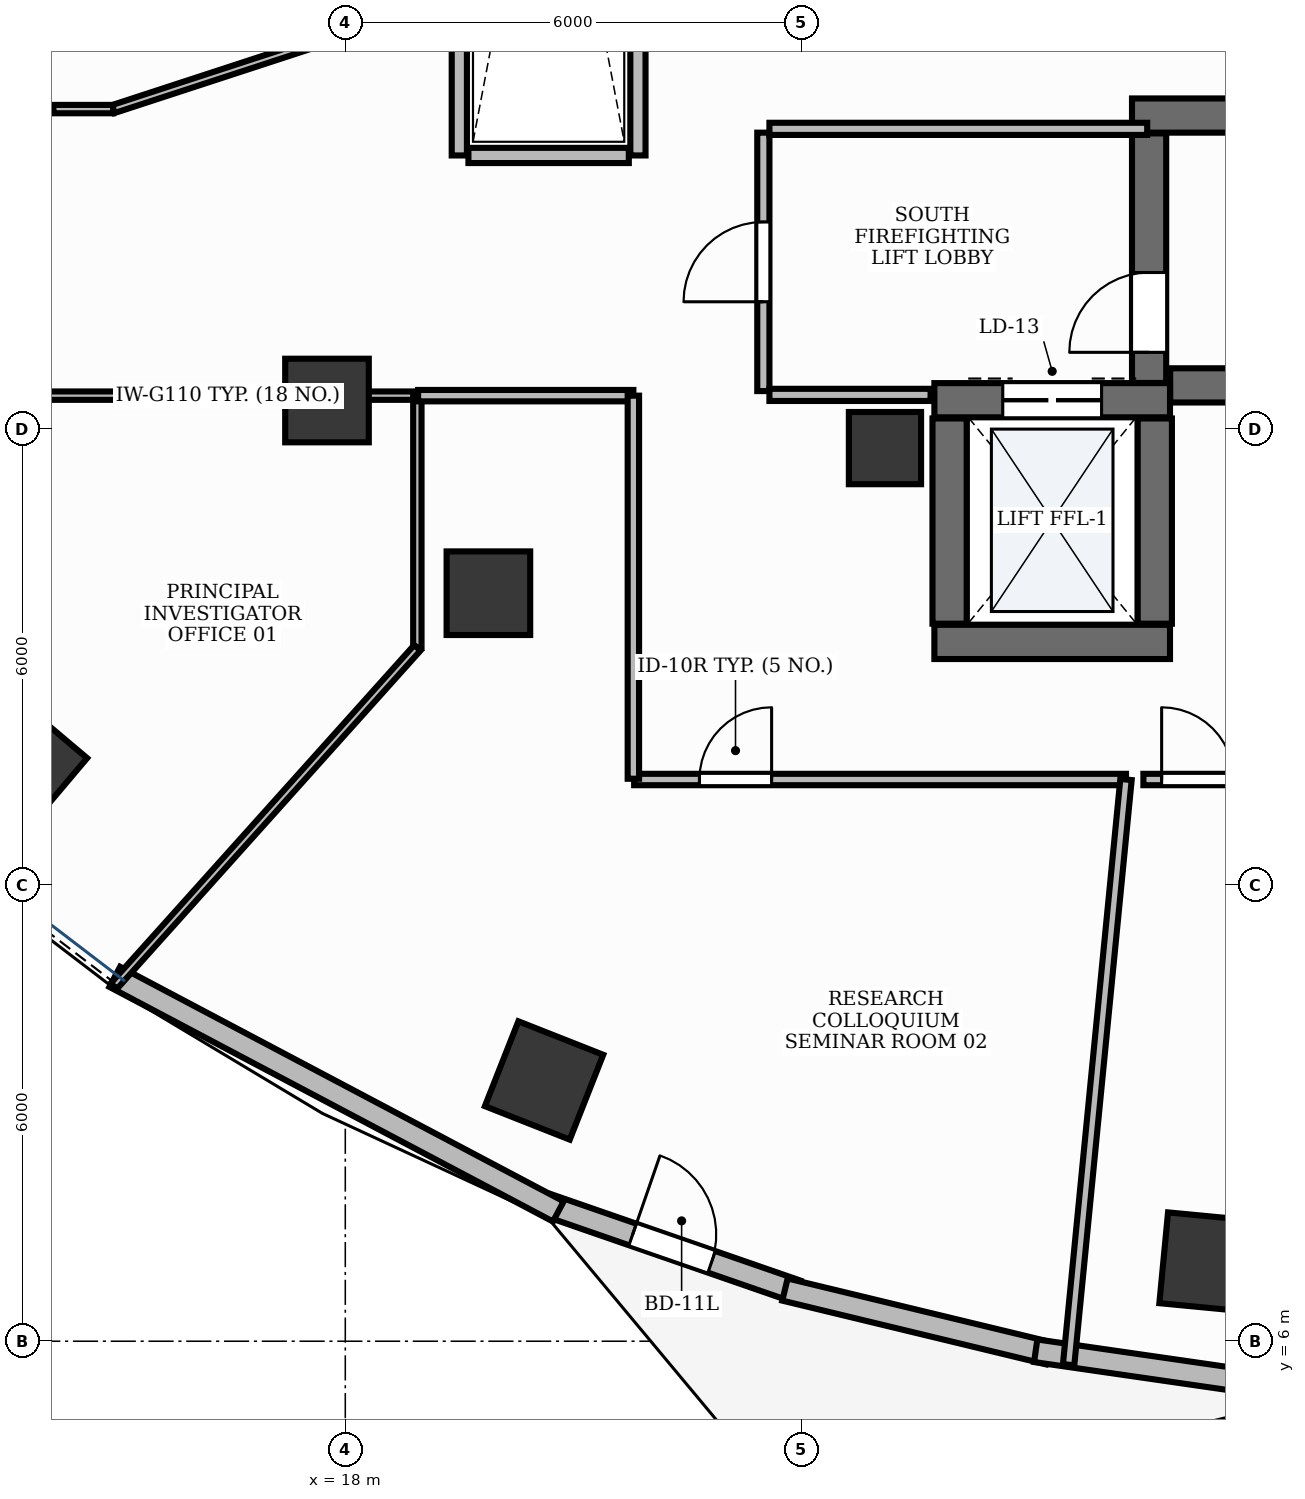
"""IFC4 building model, lengths in metres.
Left out: names, types, materials, properties, quantities, classifications, styles, units other than length and angle.
Written with IfcOpenShell. Run it as: python <this file> out.ifc"""

import sys

from ifc_helpers import new_model, si_unit, direction, frame, frame_2d, origin, origin_2d, place, context, subcontext, project, spatial, rectangle, extrude, element, fill, save


model = new_model("IFC4")
c1 = context("Model", 3, precision=1e-05, world=origin(), true_north=direction((0.0, 1.0)))
c2 = subcontext(c1, "Body", "Model", "MODEL_VIEW")
j1 = project(units=[si_unit("LENGTHUNIT", "METRE"), si_unit("PLANEANGLEUNIT", "RADIAN")], contexts=[c1])
p1 = place(None, origin())
s1 = spatial("IfcSite", under=j1, at=p1, CompositionType="ELEMENT")
p2 = place(p1, origin())
s2 = spatial("IfcBuilding", under=s1, at=p2, CompositionType="ELEMENT")
p3 = place(p2, frame((0.0, 0.0, 94.2)))
s3 = spatial("IfcBuildingStorey", under=s2, at=p3, CompositionType="ELEMENT", Elevation=94.2)
p4 = place(p3, frame((28.852, 18.575, 0.0), z_axis=(0.0, 0.0, 1.0), x_axis=(1.0, 0.0, 0.0)))
e1 = element("IfcWall", 1, at=p4, inside=s3, PredefinedType="SHEAR", context=c2, shape_type="SweptSolid", body=[
    extrude(rectangle(XDim=8.248, YDim=0.45, at=frame_2d((4.124, 0.0))), origin(), (0.0, 0.0, 1.0), 3.9),
])
p5 = place(p3, frame((28.35, 22.125, 0.0), z_axis=(0.0, 0.0, 1.0), x_axis=(1.0, 0.0, 0.0)))
e2 = element("IfcWall", 2, at=p5, inside=s3, PredefinedType="SHEAR", context=c2, shape_type="SweptSolid", body=[
    extrude(rectangle(XDim=8.75, YDim=0.45, at=frame_2d((4.375, 0.0))), origin(), (0.0, 0.0, 1.0), 3.9),
])
p6 = place(p3, frame((28.575, 18.607, 0.0), z_axis=(0.0, 0.0, 1.0), x_axis=(0.0, 1.0, 0.0)))
e3 = element("IfcWall", 3, at=p6, inside=s3, PredefinedType="SHEAR", context=c2, shape_type="SweptSolid", body=[
    extrude(rectangle(XDim=3.283, YDim=0.45, at=frame_2d((1.642, 0.0))), origin(), (0.0, 0.0, 1.0), 3.9),
])
p7 = place(p6, frame((0.403, 0.0, 0.0)))
e4 = element("IfcOpeningElement", 4, at=p7, cuts=e3, PredefinedType="OPENING", context=c2, shape_type="SweptSolid", body=[
    extrude(rectangle(XDim=1.05, YDim=2.15, at=frame_2d((0.525, 1.075))), frame((0.0, 0.24, 0.0), z_axis=(0.0, -1.0, 0.0), x_axis=(1.0, 0.0, 0.0)), (0.0, 0.0, 1.0), 0.48),
])
p8 = place(p3, frame((25.75, 15.2, 0.0), z_axis=(0.0, 0.0, 1.0), x_axis=(1.0, 0.0, 0.0)))
e5 = element("IfcWall", 5, at=p8, inside=s3, PredefinedType="SHEAR", context=c2, shape_type="SweptSolid", body=[
    extrude(rectangle(XDim=3.1, YDim=0.45, at=frame_2d((1.55, 0.0))), origin(), (0.0, 0.0, 1.0), 3.9),
])
p9 = place(p3, frame((25.75, 18.38, 0.0), z_axis=(0.0, 0.0, 1.0), x_axis=(1.0, 0.0, 0.0)))
e6 = element("IfcWall", 6, at=p9, inside=s3, PredefinedType="SHEAR", context=c2, shape_type="SweptSolid", body=[
    extrude(rectangle(XDim=3.1, YDim=0.45, at=frame_2d((1.55, 0.0))), origin(), (0.0, 0.0, 1.0), 3.9),
])
p10 = place(p9, frame((0.9, 0.0, 0.0)))
e7 = element("IfcOpeningElement", 7, at=p10, cuts=e6, PredefinedType="OPENING", context=c2, shape_type="SweptSolid", body=[
    extrude(rectangle(XDim=1.3, YDim=2.2, at=frame_2d((0.65, 1.1))), frame((0.0, 0.24, 0.0), z_axis=(0.0, -1.0, 0.0), x_axis=(1.0, 0.0, 0.0)), (0.0, 0.0, 1.0), 0.48),
])
for number, where, z_axis, x_axis in (
    (8, (25.95, 15.44, 0.0), (0.0, 0.0, 1.0), (0.0, 1.0, 0.0)),
    (9, (28.65, 15.44, 0.0), (0.0, 0.0, 1.0), (0.0, 1.0, 0.0)),
):
    element("IfcWall", number, at=place(p3, frame(where, z_axis=z_axis, x_axis=x_axis)), inside=s3, PredefinedType="SHEAR", context=c2, shape_type="SweptSolid", body=[
        extrude(rectangle(XDim=2.7, YDim=0.45, at=frame_2d((1.35, 0.0))), origin(), (0.0, 0.0, 1.0), 3.9),
    ])
p11 = place(p3, frame((25.1, 17.75, -0.0), z_axis=(0.0, 0.0, 1.0), x_axis=(1.0, 0.0, 0.0)))
e10 = element("IfcColumn", 10, at=p11, inside=s3, PredefinedType="PILASTER", context=c2, shape_type="SweptSolid", body=[
    extrude(rectangle(XDim=0.95, YDim=0.95, at=origin_2d()), origin(), (0.0, 0.0, 1.0), 3.901),
])
p12 = place(p3, frame((17.759, 18.376, -0.0), z_axis=(0.0, 0.0, 1.0), x_axis=(1.0, 0.0, 0.0)))
e11 = element("IfcColumn", 11, at=p12, inside=s3, PredefinedType="COLUMN", context=c2, shape_type="SweptSolid", body=[
    extrude(rectangle(XDim=1.1, YDim=1.1, at=origin_2d()), origin(), (0.0, 0.0, 1.0), 3.901),
])
p13 = place(p3, frame((13.758, 13.6, -0.0), z_axis=(0.0, 0.0, 1.0), x_axis=(-0.764246456939, 0.644924300253, 0.0)))
e12 = element("IfcColumn", 12, at=p13, inside=s3, PredefinedType="COLUMN", context=c2, shape_type="SweptSolid", body=[
    extrude(rectangle(XDim=1.2, YDim=1.2, at=origin_2d()), origin(), (0.0, 0.0, 1.0), 3.901),
])
p14 = place(p3, frame((19.883, 15.841, -0.0), z_axis=(0.0, 0.0, 1.0), x_axis=(1.0, 0.0, 0.0)))
e13 = element("IfcColumn", 13, at=p14, inside=s3, PredefinedType="COLUMN", context=c2, shape_type="SweptSolid", body=[
    extrude(rectangle(XDim=1.1, YDim=1.1, at=origin_2d()), origin(), (0.0, 0.0, 1.0), 3.901),
])
for number, where, z_axis, x_axis in (
    (14, (20.615, 9.431, -0.0), (0.0, 0.0, 1.0), (-0.93, 0.367, 0.0)),
    (15, (29.364, 7.041, -0.0), (0.0, 0.0, 1.0), (-0.995, 0.095, 0.0)),
):
    element("IfcColumn", number, at=place(p3, frame(where, z_axis=z_axis, x_axis=x_axis)), inside=s3, PredefinedType="COLUMN", context=c2, shape_type="SweptSolid", body=[
        extrude(rectangle(XDim=1.2, YDim=1.2, at=origin_2d()), origin(), (0.0, 0.0, 1.0), 3.901),
    ])
p15 = place(p3, frame((20.662, 7.792, 0.0), z_axis=(0.0, 0.0, 1.0), x_axis=(0.944878029854, -0.3274225232, 0.0)))
e16 = element("IfcWall", 16, at=p15, inside=s3, PredefinedType="STANDARD", context=c2, shape_type="SweptSolid", body=[
    extrude(rectangle(XDim=3.467, YDim=0.3, at=frame_2d((1.734, 0.0))), origin(), (0.0, 0.0, 1.0), 3.9),
])
p16 = place(p15, frame((1.184, 0.0, 0.0)))
e17 = element("IfcOpeningElement", 17, at=p16, cuts=e16, PredefinedType="OPENING", context=c2, shape_type="SweptSolid", body=[
    extrude(rectangle(XDim=1.1, YDim=2.15, at=frame_2d((0.55, 1.075))), frame((0.0, 0.165, 0.0), z_axis=(0.0, -1.0, 0.0), x_axis=(1.0, 0.0, 0.0)), (0.0, 0.0, 1.0), 0.33),
])
p17 = place(p3, frame((14.967, 10.794, 0.0), z_axis=(0.0, 0.0, 1.0), x_axis=(0.883986649445, -0.467512142734, 0.0)))
e18 = element("IfcWall", 18, at=p17, inside=s3, PredefinedType="STANDARD", context=c2, shape_type="SweptSolid", body=[
    extrude(rectangle(XDim=6.601, YDim=0.3, at=frame_2d((3.301, 0.0))), origin(), (0.0, 0.0, 1.0), 3.9),
])
p18 = place(p3, frame((23.784, 6.68, 0.0), z_axis=(0.0, 0.0, 1.0), x_axis=(0.972043452321, -0.234801036625, 0.0)))
e19 = element("IfcWall", 19, at=p18, inside=s3, PredefinedType="STANDARD", context=c2, shape_type="SweptSolid", body=[
    extrude(rectangle(XDim=3.569, YDim=0.3, at=frame_2d((1.784, 0.0))), origin(), (0.0, 0.0, 1.0), 3.9),
])
p19 = place(p3, frame((27.083, 5.875, 0.0), z_axis=(0.0, 0.0, 1.0), x_axis=(0.989734732902, -0.142916613754, 0.0)))
e20 = element("IfcWall", 20, at=p19, inside=s3, PredefinedType="STANDARD", context=c2, shape_type="SweptSolid", body=[
    extrude(rectangle(XDim=3.611, YDim=0.3, at=frame_2d((1.806, 0.0))), origin(), (0.0, 0.0, 1.0), 3.9),
])
for number, where, z_axis, x_axis in (
    (21, (19.5, 21.6, 0.0), (0.0, 0.0, 1.0), (0.0, 1.0, 0.0)),
    (22, (21.85, 21.6, 0.0), (0.0, 0.0, 1.0), (0.0, 1.0, 0.0)),
):
    element("IfcWall", number, at=place(p3, frame(where, z_axis=z_axis, x_axis=x_axis)), inside=s3, PredefinedType="PARTITIONING", context=c2, shape_type="SweptSolid", body=[
        extrude(rectangle(XDim=10.8, YDim=0.2, at=frame_2d((5.4, 0.0))), origin(), (0.0, 0.0, 1.0), 2.91),
    ])
p20 = place(p3, frame((19.62, 21.6, 0.0), z_axis=(0.0, 0.0, 1.0), x_axis=(1.0, 0.0, 0.0)))
e23 = element("IfcWall", 23, at=p20, inside=s3, PredefinedType="PARTITIONING", context=c2, shape_type="SweptSolid", body=[
    extrude(rectangle(XDim=2.11, YDim=0.2, at=frame_2d((1.055, 0.0))), origin(), (0.0, 0.0, 1.0), 2.91),
])
p21 = place(p3, frame((23.5, 18.5, 0.0), z_axis=(0.0, 0.0, 1.0), x_axis=(0.0, 1.0, 0.0)))
e24 = element("IfcWall", 24, at=p21, inside=s3, PredefinedType="PARTITIONING", context=c2, shape_type="SweptSolid", body=[
    extrude(rectangle(XDim=3.4, YDim=0.16, at=frame_2d((1.7, 0.0))), origin(), (0.0, 0.0, 1.0), 2.91),
])
p22 = place(p21, frame((1.175, 0.0, 0.0)))
e25 = element("IfcOpeningElement", 25, at=p22, cuts=e24, PredefinedType="OPENING", context=c2, shape_type="SweptSolid", body=[
    extrude(rectangle(XDim=1.05, YDim=2.15, at=frame_2d((0.525, 1.075))), frame((0.0, 0.095, 0.0), z_axis=(0.0, -1.0, 0.0), x_axis=(1.0, 0.0, 0.0)), (0.0, 0.0, 1.0), 0.19),
])
p23 = place(p3, frame((23.58, 21.95, 0.0), z_axis=(0.0, 0.0, 1.0), x_axis=(1.0, 0.0, 0.0)))
e26 = element("IfcWall", 26, at=p23, inside=s3, PredefinedType="PARTITIONING", context=c2, shape_type="SweptSolid", body=[
    extrude(rectangle(XDim=4.97, YDim=0.16, at=frame_2d((2.485, 0.0))), origin(), (0.0, 0.0, 1.0), 2.91),
])
p24 = place(p3, frame((23.58, 18.45, 0.0), z_axis=(0.0, 0.0, 1.0), x_axis=(1.0, 0.0, 0.0)))
e27 = element("IfcWall", 27, at=p24, inside=s3, PredefinedType="PARTITIONING", context=c2, shape_type="SweptSolid", body=[
    extrude(rectangle(XDim=2.12, YDim=0.16, at=frame_2d((1.06, 0.0))), origin(), (0.0, 0.0, 1.0), 2.91),
])
p25 = place(p3, frame((11.59, 18.44, 0.0), z_axis=(0.0, 0.0, 1.0), x_axis=(1.0, 0.0, 0.0)))
e28 = element("IfcWall", 28, at=p25, inside=s3, PredefinedType="MOVABLE", context=c2, shape_type="SweptSolid", body=[
    extrude(rectangle(XDim=7.358, YDim=0.11, at=frame_2d((3.679, 0.0))), origin(), (0.0, 0.0, 1.0), 2.91),
])
p26 = place(p25, frame((1.206, 0.0, 0.0)))
e29 = element("IfcOpeningElement", 29, at=p26, cuts=e28, PredefinedType="OPENING", context=c2, shape_type="SweptSolid", body=[
    extrude(rectangle(XDim=0.95, YDim=2.15, at=frame_2d((0.475, 1.075))), frame((0.0, 0.07, 0.0), z_axis=(0.0, -1.0, 0.0), x_axis=(1.0, 0.0, 0.0)), (0.0, 0.0, 1.0), 0.14),
])
p27 = place(p3, frame((21.8, 13.39, 0.0), z_axis=(0.0, 0.0, 1.0), x_axis=(1.0, 0.0, 0.0)))
e30 = element("IfcWall", 30, at=p27, inside=s3, PredefinedType="PARTITIONING", context=c2, shape_type="SweptSolid", body=[
    extrude(rectangle(XDim=6.471, YDim=0.15, at=frame_2d((3.236, 0.0))), origin(), (0.0, 0.0, 1.0), 2.91),
])
p28 = place(p27, frame((0.859, 0.0, 0.0)))
e31 = element("IfcOpeningElement", 31, at=p28, cuts=e30, PredefinedType="OPENING", context=c2, shape_type="SweptSolid", body=[
    extrude(rectangle(XDim=0.95, YDim=2.15, at=frame_2d((0.475, 1.075))), frame((0.0, 0.09, 0.0), z_axis=(0.0, -1.0, 0.0), x_axis=(1.0, 0.0, 0.0)), (0.0, 0.0, 1.0), 0.18),
])
p29 = place(p3, frame((28.5, 13.39, 0.0), z_axis=(0.0, 0.0, 1.0), x_axis=(1.0, 0.0, 0.0)))
e32 = element("IfcWall", 32, at=p29, inside=s3, PredefinedType="PARTITIONING", context=c2, shape_type="SweptSolid", body=[
    extrude(rectangle(XDim=7.1, YDim=0.15, at=frame_2d((3.55, 0.0))), origin(), (0.0, 0.0, 1.0), 2.91),
])
p30 = place(p29, frame((0.24, 0.0, 0.0)))
e33 = element("IfcOpeningElement", 33, at=p30, cuts=e32, PredefinedType="OPENING", context=c2, shape_type="SweptSolid", body=[
    extrude(rectangle(XDim=0.95, YDim=2.15, at=frame_2d((0.475, 1.075))), frame((0.0, 0.09, 0.0), z_axis=(0.0, -1.0, 0.0), x_axis=(1.0, 0.0, 0.0)), (0.0, 0.0, 1.0), 0.18),
])
p31 = place(p3, frame((18.948, 18.44, 0.0), z_axis=(0.0, 0.0, 1.0), x_axis=(0.0, -1.0, 0.0)))
e34 = element("IfcWall", 34, at=p31, inside=s3, PredefinedType="MOVABLE", context=c2, shape_type="SweptSolid", body=[
    extrude(rectangle(XDim=3.317, YDim=0.11, at=frame_2d((1.659, 0.0))), origin(), (0.0, 0.0, 1.0), 2.91),
])
p32 = place(p3, frame((18.948, 15.123, 0.0), z_axis=(0.0, 0.0, 1.0), x_axis=(-0.667833771006, -0.744310455592, 0.0)))
e35 = element("IfcWall", 35, at=p32, inside=s3, PredefinedType="MOVABLE", context=c2, shape_type="SweptSolid", body=[
    extrude(rectangle(XDim=5.979, YDim=0.11, at=frame_2d((2.99, 0.0))), origin(), (0.0, 0.0, 1.0), 2.91),
])
p33 = place(p3, frame((18.958, 18.44, 0.0), z_axis=(0.0, 0.0, 1.0), x_axis=(1.0, 0.0, 0.0)))
e36 = element("IfcWall", 36, at=p33, inside=s3, PredefinedType="PARTITIONING", context=c2, shape_type="SweptSolid", body=[
    extrude(rectangle(XDim=2.832, YDim=0.15, at=frame_2d((1.416, 0.0))), origin(), (0.0, 0.0, 1.0), 2.91),
])
p34 = place(p3, frame((21.79, 18.44, 0.0), z_axis=(0.0, 0.0, 1.0), x_axis=(0.0, -1.0, 0.0)))
e37 = element("IfcWall", 37, at=p34, inside=s3, PredefinedType="PARTITIONING", context=c2, shape_type="SweptSolid", body=[
    extrude(rectangle(XDim=5.04, YDim=0.15, at=frame_2d((2.52, 0.0))), origin(), (0.0, 0.0, 1.0), 2.91),
])
p35 = place(p3, frame((28.271, 13.39, 0.0), z_axis=(0.0, 0.0, 1.0), x_axis=(-0.097584908723, -0.995227202999, 0.0)))
e38 = element("IfcWall", 38, at=p35, inside=s3, PredefinedType="PARTITIONING", context=c2, shape_type="SweptSolid", body=[
    extrude(rectangle(XDim=7.736, YDim=0.15, at=frame_2d((3.868, 0.0))), origin(), (0.0, 0.0, 1.0), 2.91),
])
p36 = place(p3, frame((18.948, 23.518, 0.0), z_axis=(0.0, 0.0, 1.0), x_axis=(-0.950522660163, -0.31065523095, 0.0)))
e39 = element("IfcWall", 39, at=p36, inside=s3, PredefinedType="MOVABLE", context=c2, shape_type="SweptSolid", body=[
    extrude(rectangle(XDim=4.21, YDim=0.11, at=frame_2d((2.105, 0.0))), origin(), (0.0, 0.0, 1.0), 2.91),
])
p37 = place(p3, frame((14.946, 22.21, 0.0), z_axis=(0.0, 0.0, 1.0), x_axis=(-1.0, 0.0, 0.0)))
e40 = element("IfcWall", 40, at=p37, inside=s3, PredefinedType="MOVABLE", context=c2, shape_type="SweptSolid", body=[
    extrude(rectangle(XDim=0.786, YDim=0.11, at=frame_2d((0.393, 0.0))), origin(), (0.0, 0.0, 1.0), 2.91),
])
p38 = place(p16, origin())
e41 = element("IfcDoor", 41, at=p38, inside=s3, OperationType="SINGLE_SWING_LEFT", PredefinedType="DOOR", context=c2, shape_type="SweptSolid", body=[
    extrude(rectangle(XDim=1.1, YDim=2.15, at=frame_2d((0.55, 1.075))), frame((0.0, 0.025, 0.0), z_axis=(0.0, -1.0, 0.0), x_axis=(1.0, 0.0, 0.0)), (0.0, 0.0, 1.0), 0.05),
])
fill(e17, e41)
p39 = place(p7, origin())
e42 = element("IfcDoor", 42, at=p39, inside=s3, OperationType="SINGLE_SWING_LEFT", PredefinedType="DOOR", context=c2, shape_type="SweptSolid", body=[
    extrude(rectangle(XDim=1.05, YDim=2.15, at=frame_2d((0.525, 1.075))), frame((0.0, 0.025, 0.0), z_axis=(0.0, -1.0, 0.0), x_axis=(1.0, 0.0, 0.0)), (0.0, 0.0, 1.0), 0.05),
])
fill(e4, e42)
p40 = place(p10, origin())
e43 = element("IfcDoor", 43, at=p40, inside=s3, OperationType="DOUBLE_DOOR_SLIDING", PredefinedType="DOOR", context=c2, shape_type="SweptSolid", body=[
    extrude(rectangle(XDim=1.3, YDim=2.2, at=frame_2d((0.65, 1.1))), frame((0.0, 0.025, 0.0), z_axis=(0.0, -1.0, 0.0), x_axis=(1.0, 0.0, 0.0)), (0.0, 0.0, 1.0), 0.05),
])
fill(e7, e43)
p41 = place(p22, origin())
e44 = element("IfcDoor", 44, at=p41, inside=s3, OperationType="SINGLE_SWING_LEFT", PredefinedType="DOOR", context=c2, shape_type="SweptSolid", body=[
    extrude(rectangle(XDim=1.05, YDim=2.15, at=frame_2d((0.525, 1.075))), frame((0.0, 0.025, 0.0), z_axis=(0.0, -1.0, 0.0), x_axis=(1.0, 0.0, 0.0)), (0.0, 0.0, 1.0), 0.05),
])
fill(e25, e44)
p42 = place(p28, origin())
e45 = element("IfcDoor", 45, at=p42, inside=s3, OperationType="SINGLE_SWING_RIGHT", PredefinedType="DOOR", context=c2, shape_type="SweptSolid", body=[
    extrude(rectangle(XDim=0.95, YDim=2.15, at=frame_2d((0.475, 1.075))), frame((0.0, 0.025, 0.0), z_axis=(0.0, -1.0, 0.0), x_axis=(1.0, 0.0, 0.0)), (0.0, 0.0, 1.0), 0.05),
])
fill(e31, e45)
p43 = place(p30, origin())
e46 = element("IfcDoor", 46, at=p43, inside=s3, OperationType="SINGLE_SWING_LEFT", PredefinedType="DOOR", context=c2, shape_type="SweptSolid", body=[
    extrude(rectangle(XDim=0.95, YDim=2.15, at=frame_2d((0.475, 1.075))), frame((0.0, 0.025, 0.0), z_axis=(0.0, -1.0, 0.0), x_axis=(1.0, 0.0, 0.0)), (0.0, 0.0, 1.0), 0.05),
])
fill(e33, e46)
save(model, sys.argv[1])
